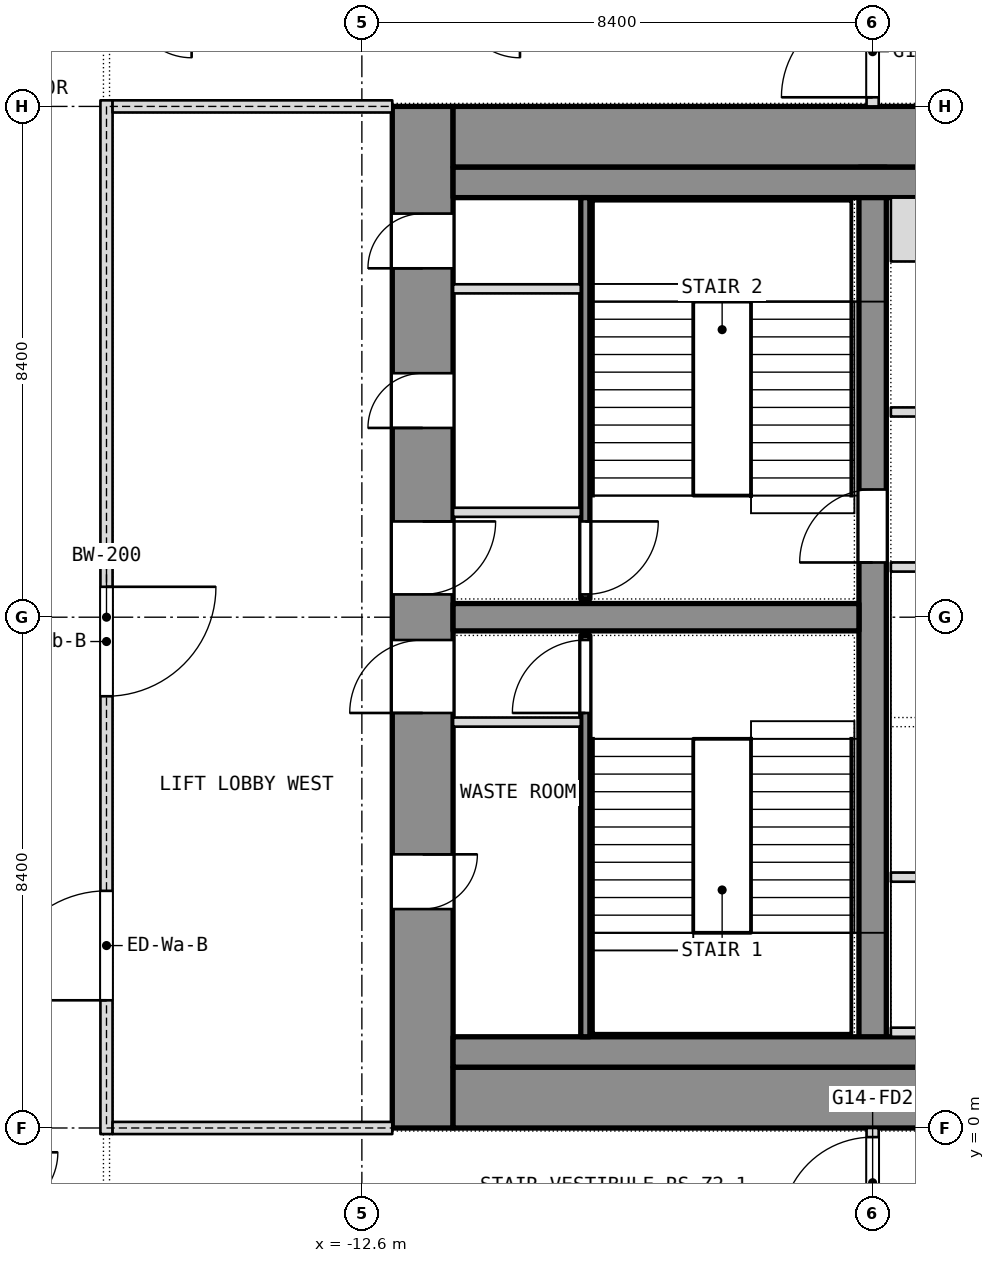
"""IFC4 building model, lengths in metres.
Left out: names, types, materials, properties, quantities, classifications, styles, units other than length and angle.
Written with IfcOpenShell. Run it as: python <this file> out.ifc"""

import sys

from ifc_helpers import new_model, si_unit, direction, frame, frame_2d, origin, place, context, subcontext, project, spatial, rectangle, extrude, element, fill, save


model = new_model("IFC4")
c1 = context("Model", 3, precision=1e-05, world=origin(), true_north=direction((0.0, 1.0)))
c2 = subcontext(c1, "Body", "Model", "MODEL_VIEW")
j1 = project(units=[si_unit("LENGTHUNIT", "METRE"), si_unit("PLANEANGLEUNIT", "RADIAN")], contexts=[c1])
p1 = place(None, origin())
s1 = spatial("IfcSite", under=j1, at=p1, CompositionType="ELEMENT")
p2 = place(p1, origin())
s2 = spatial("IfcBuilding", under=s1, at=p2, CompositionType="ELEMENT")
p3 = place(p2, frame((0.0, 0.0, 166.1)))
s3 = spatial("IfcBuildingStorey", under=s2, at=p3, CompositionType="ELEMENT", Elevation=166.1)
p4 = place(p3, frame((-11.6, 0.0, 0.0), z_axis=(0.0, 0.0, 1.0), x_axis=(0.0, 1.0, 0.0)))
e1 = element("IfcWall", 1, at=p4, inside=s3, PredefinedType="SHEAR", context=c2, shape_type="SweptSolid", body=[
    extrude(rectangle(XDim=16.8, YDim=1.0, at=frame_2d((8.4, 0.0))), origin(), (0.0, 0.0, 1.0), 3.6),
])
p5 = place(p4, frame((3.6, 0.0, 0.0)))
e2 = element("IfcOpeningElement", 2, at=p5, cuts=e1, PredefinedType="OPENING", context=c2, shape_type="SweptSolid", body=[
    extrude(rectangle(XDim=0.9, YDim=2.1, at=frame_2d((0.45, 1.05))), frame((0.0, 0.5, 0.0), z_axis=(0.0, -1.0, 0.0), x_axis=(1.0, 0.0, 0.0)), (0.0, 0.0, 1.0), 1.0),
])
p6 = place(p4, frame((6.825, 0.0, 0.0)))
e3 = element("IfcOpeningElement", 3, at=p6, cuts=e1, PredefinedType="OPENING", context=c2, shape_type="SweptSolid", body=[
    extrude(rectangle(XDim=1.2, YDim=2.1, at=frame_2d((0.6, 1.05))), frame((0.0, 0.5, 0.0), z_axis=(0.0, -1.0, 0.0), x_axis=(1.0, 0.0, 0.0)), (0.0, 0.0, 1.0), 1.0),
])
p7 = place(p4, frame((14.137, 0.0, 0.0)))
e4 = element("IfcOpeningElement", 4, at=p7, cuts=e1, PredefinedType="OPENING", context=c2, shape_type="SweptSolid", body=[
    extrude(rectangle(XDim=0.9, YDim=2.1, at=frame_2d((0.45, 1.05))), frame((0.0, 0.5, 0.0), z_axis=(0.0, -1.0, 0.0), x_axis=(1.0, 0.0, 0.0)), (0.0, 0.0, 1.0), 1.0),
])
p8 = place(p4, frame((11.512, 0.0, 0.0)))
e5 = element("IfcOpeningElement", 5, at=p8, cuts=e1, PredefinedType="OPENING", context=c2, shape_type="SweptSolid", body=[
    extrude(rectangle(XDim=0.9, YDim=2.1, at=frame_2d((0.45, 1.05))), frame((0.0, 0.5, 0.0), z_axis=(0.0, -1.0, 0.0), x_axis=(1.0, 0.0, 0.0)), (0.0, 0.0, 1.0), 1.0),
])
p9 = place(p4, frame((8.775, 0.0, 0.0)))
e6 = element("IfcOpeningElement", 6, at=p9, cuts=e1, PredefinedType="OPENING", context=c2, shape_type="SweptSolid", body=[
    extrude(rectangle(XDim=1.2, YDim=2.1, at=frame_2d((0.6, 1.05))), frame((0.0, 0.5, 0.0), z_axis=(0.0, -1.0, 0.0), x_axis=(1.0, 0.0, 0.0)), (0.0, 0.0, 1.0), 1.0),
])
for number, where, z_axis, x_axis in (
    (7, (-11.1, 0.5, 0.0), (0.0, 0.0, 1.0), (1.0, 0.0, 0.0)),
    (8, (-11.1, 16.3, 0.0), (0.0, 0.0, 1.0), (1.0, 0.0, 0.0)),
):
    element("IfcWall", number, at=place(p3, frame(where, z_axis=z_axis, x_axis=x_axis)), inside=s3, PredefinedType="SHEAR", context=c2, shape_type="SweptSolid", body=[
        extrude(rectangle(XDim=22.2, YDim=1.0, at=frame_2d((11.1, 0.0))), origin(), (0.0, 0.0, 1.0), 3.6),
    ])
p10 = place(p3, frame((-4.2, 1.0, 0.0), z_axis=(0.0, 0.0, 1.0), x_axis=(0.0, 1.0, 0.0)))
e9 = element("IfcWall", 9, at=p10, inside=s3, PredefinedType="SHEAR", context=c2, shape_type="SweptSolid", body=[
    extrude(rectangle(XDim=14.8, YDim=0.45, at=frame_2d((7.4, 0.0))), origin(), (0.0, 0.0, 1.0), 3.6),
])
p11 = place(p10, frame((8.3, 0.0, 0.0)))
e10 = element("IfcOpeningElement", 10, at=p11, cuts=e9, PredefinedType="OPENING", context=c2, shape_type="SweptSolid", body=[
    extrude(rectangle(XDim=1.2, YDim=2.1, at=frame_2d((0.6, 1.05))), frame((0.0, 0.225, 0.0), z_axis=(0.0, -1.0, 0.0), x_axis=(1.0, 0.0, 0.0)), (0.0, 0.0, 1.0), 0.45),
])
p12 = place(p3, frame((-11.1, 8.4, 0.0), z_axis=(0.0, 0.0, 1.0), x_axis=(1.0, 0.0, 0.0)))
e11 = element("IfcWall", 11, at=p12, inside=s3, PredefinedType="SHEAR", context=c2, shape_type="SweptSolid", body=[
    extrude(rectangle(XDim=6.675, YDim=0.45, at=frame_2d((3.337, 0.0))), origin(), (0.0, 0.0, 1.0), 3.6),
])
p13 = place(p3, frame((-4.2, 16.8, 0.0), z_axis=(0.0, 0.0, 1.0), x_axis=(0.0, 1.0, 0.0)))
e12 = element("IfcWall", 12, at=p13, inside=s3, PredefinedType="PARTITIONING", context=c2, shape_type="SweptSolid", body=[
    extrude(rectangle(XDim=11.14, YDim=0.2, at=frame_2d((5.57, 0.0))), origin(), (0.0, 0.0, 1.0), 3.3),
])
p14 = place(p13, frame((0.15, 0.0, 0.0)))
e13 = element("IfcOpeningElement", 13, at=p14, cuts=e12, PredefinedType="OPENING", context=c2, shape_type="SweptSolid", body=[
    extrude(rectangle(XDim=1.5, YDim=2.1, at=frame_2d((0.75, 1.05))), frame((0.0, 0.1, 0.0), z_axis=(0.0, -1.0, 0.0), x_axis=(1.0, 0.0, 0.0)), (0.0, 0.0, 1.0), 0.2),
])
p15 = place(p3, frame((-4.2, -13.8, 0.0), z_axis=(0.0, 0.0, 1.0), x_axis=(0.0, 1.0, 0.0)))
e14 = element("IfcWall", 14, at=p15, inside=s3, PredefinedType="PARTITIONING", context=c2, shape_type="SweptSolid", body=[
    extrude(rectangle(XDim=13.8, YDim=0.2, at=frame_2d((6.9, 0.0))), origin(), (0.0, 0.0, 1.0), 2.486),
])
p16 = place(p15, frame((12.15, 0.0, 0.0)))
e15 = element("IfcOpeningElement", 15, at=p16, cuts=e14, PredefinedType="OPENING", context=c2, shape_type="SweptSolid", body=[
    extrude(rectangle(XDim=1.5, YDim=2.1, at=frame_2d((0.75, 1.05))), frame((0.0, 0.1, 0.0), z_axis=(0.0, -1.0, 0.0), x_axis=(1.0, 0.0, 0.0)), (0.0, 0.0, 1.0), 0.2),
])
p17 = place(p15, frame((0.325, 0.0, 0.0)))
e16 = element("IfcOpeningElement", 16, at=p17, cuts=e14, PredefinedType="OPENING", context=c2, shape_type="SweptSolid", body=[
    extrude(rectangle(XDim=1.5, YDim=2.1, at=frame_2d((0.75, 1.05))), frame((0.0, 0.1, 0.0), z_axis=(0.0, -1.0, 0.0), x_axis=(1.0, 0.0, 0.0)), (0.0, 0.0, 1.0), 0.2),
])
for number, where, z_axis, x_axis in (
    (17, (-11.1, 1.25, 0.0), (0.0, 0.0, 1.0), (1.0, 0.0, 0.0)),
    (18, (-11.1, 15.55, 0.0), (0.0, 0.0, 1.0), (1.0, 0.0, 0.0)),
):
    element("IfcWall", number, at=place(p3, frame(where, z_axis=z_axis, x_axis=x_axis)), inside=s3, PredefinedType="PARTITIONING", context=c2, shape_type="SweptSolid", body=[
        extrude(rectangle(XDim=22.2, YDim=0.5, at=frame_2d((11.1, 0.0))), origin(), (0.0, 0.0, 1.0), 3.3),
    ])
p18 = place(p3, frame((-8.925, 1.5, 0.0), z_axis=(0.0, 0.0, 1.0), x_axis=(0.0, 1.0, 0.0)))
e19 = element("IfcWall", 19, at=p18, inside=s3, PredefinedType="SHEAR", context=c2, shape_type="SweptSolid", body=[
    extrude(rectangle(XDim=6.6, YDim=0.15, at=frame_2d((3.3, 0.0))), origin(), (0.0, 0.0, 1.0), 3.3),
])
p19 = place(p18, frame((5.325, 0.0, 0.0)))
e20 = element("IfcOpeningElement", 20, at=p19, cuts=e19, PredefinedType="OPENING", context=c2, shape_type="SweptSolid", body=[
    extrude(rectangle(XDim=1.2, YDim=2.1, at=frame_2d((0.6, 1.05))), frame((0.0, 0.075, 0.0), z_axis=(0.0, -1.0, 0.0), x_axis=(1.0, 0.0, 0.0)), (0.0, 0.0, 1.0), 0.15),
])
p20 = place(p3, frame((-11.1, 6.675, 0.0), z_axis=(0.0, 0.0, 1.0), x_axis=(1.0, 0.0, 0.0)))
e21 = element("IfcWall", 21, at=p20, inside=s3, PredefinedType="PARTITIONING", context=c2, shape_type="SweptSolid", body=[
    extrude(rectangle(XDim=2.1, YDim=0.15, at=frame_2d((1.05, 0.0))), origin(), (0.0, 0.0, 1.0), 3.3),
])
p21 = place(p3, frame((-8.925, 8.7, 0.0), z_axis=(0.0, 0.0, 1.0), x_axis=(0.0, 1.0, 0.0)))
e22 = element("IfcWall", 22, at=p21, inside=s3, PredefinedType="SHEAR", context=c2, shape_type="SweptSolid", body=[
    extrude(rectangle(XDim=6.6, YDim=0.15, at=frame_2d((3.3, 0.0))), origin(), (0.0, 0.0, 1.0), 3.3),
])
p22 = place(p21, frame((0.075, 0.0, 0.0)))
e23 = element("IfcOpeningElement", 23, at=p22, cuts=e22, PredefinedType="OPENING", context=c2, shape_type="SweptSolid", body=[
    extrude(rectangle(XDim=1.2, YDim=2.1, at=frame_2d((0.6, 1.05))), frame((0.0, 0.075, 0.0), z_axis=(0.0, -1.0, 0.0), x_axis=(1.0, 0.0, 0.0)), (0.0, 0.0, 1.0), 0.15),
])
for number, where, z_axis, x_axis in (
    (24, (-11.1, 10.125, 0.0), (0.0, 0.0, 1.0), (1.0, 0.0, 0.0)),
    (25, (-11.1, 13.8, 0.0), (0.0, 0.0, 1.0), (1.0, 0.0, 0.0)),
):
    element("IfcWall", number, at=place(p3, frame(where, z_axis=z_axis, x_axis=x_axis)), inside=s3, PredefinedType="PARTITIONING", context=c2, shape_type="SweptSolid", body=[
        extrude(rectangle(XDim=2.1, YDim=0.15, at=frame_2d((1.05, 0.0))), origin(), (0.0, 0.0, 1.0), 3.3),
    ])
p23 = place(p3, frame((-3.9, 4.125, 0.0), z_axis=(0.0, 0.0, 1.0), x_axis=(1.0, 0.0, 0.0)))
e26 = element("IfcWall", 26, at=p23, inside=s3, PredefinedType="PARTITIONING", context=c2, shape_type="SweptSolid", body=[
    extrude(rectangle(XDim=7.8, YDim=0.15, at=frame_2d((3.9, 0.0))), origin(), (0.0, 0.0, 1.0), 3.3),
])
p24 = place(p23, frame((3.75, 0.0, 0.0)))
e27 = element("IfcOpeningElement", 27, at=p24, cuts=e26, PredefinedType="OPENING", context=c2, shape_type="SweptSolid", body=[
    extrude(rectangle(XDim=1.2, YDim=2.1, at=frame_2d((0.6, 1.05))), frame((0.0, 0.075, 0.0), z_axis=(0.0, -1.0, 0.0), x_axis=(1.0, 0.0, 0.0)), (0.0, 0.0, 1.0), 0.15),
])
p25 = place(p3, frame((-3.9, 11.775, 0.0), z_axis=(0.0, 0.0, 1.0), x_axis=(1.0, 0.0, 0.0)))
e28 = element("IfcWall", 28, at=p25, inside=s3, PredefinedType="PARTITIONING", context=c2, shape_type="SweptSolid", body=[
    extrude(rectangle(XDim=7.8, YDim=0.15, at=frame_2d((3.9, 0.0))), origin(), (0.0, 0.0, 1.0), 3.3),
])
p26 = place(p25, frame((3.3, 0.0, 0.0)))
e29 = element("IfcOpeningElement", 29, at=p26, cuts=e28, PredefinedType="OPENING", context=c2, shape_type="SweptSolid", body=[
    extrude(rectangle(XDim=1.2, YDim=2.1, at=frame_2d((0.6, 1.05))), frame((0.0, 0.075, 0.0), z_axis=(0.0, -1.0, 0.0), x_axis=(1.0, 0.0, 0.0)), (0.0, 0.0, 1.0), 0.15),
])
p27 = place(p3, frame((-3.9, 1.575, 0.0), z_axis=(0.0, 0.0, 1.0), x_axis=(1.0, 0.0, 0.0)))
e30 = element("IfcWall", 30, at=p27, inside=s3, PredefinedType="SHEAR", context=c2, shape_type="SweptSolid", body=[
    extrude(rectangle(XDim=3.0, YDim=0.15, at=frame_2d((1.5, 0.0))), origin(), (0.0, 0.0, 1.0), 3.6),
])
p28 = place(p3, frame((-3.9, 9.225, 0.0), z_axis=(0.0, 0.0, 1.0), x_axis=(1.0, 0.0, 0.0)))
e31 = element("IfcWall", 31, at=p28, inside=s3, PredefinedType="SHEAR", context=c2, shape_type="SweptSolid", body=[
    extrude(rectangle(XDim=2.25, YDim=0.15, at=frame_2d((1.125, 0.0))), origin(), (0.0, 0.0, 1.0), 3.6),
])
p29 = place(p3, frame((-3.9, 14.775, 0.0), z_axis=(0.0, 0.0, 1.0), x_axis=(1.0, 0.0, 0.0)))
e32 = element("IfcWall", 32, at=p29, inside=s3, PredefinedType="PARTITIONING", context=c2, shape_type="SweptSolid", body=[
    extrude(rectangle(XDim=2.25, YDim=1.05, at=frame_2d((1.125, 0.0))), origin(), (0.0, 0.0, 1.0), 3.3),
])
p30 = place(p3, frame((-16.8, -0.1, 0.0), z_axis=(0.0, 0.0, 1.0), x_axis=(0.0, 1.0, 0.0)))
e33 = element("IfcWall", 33, at=p30, inside=s3, PredefinedType="PARTITIONING", context=c2, shape_type="SweptSolid", body=[
    extrude(rectangle(XDim=17.0, YDim=0.2, at=frame_2d((8.5, 0.0))), origin(), (0.0, 0.0, 1.0), 3.3),
])
p31 = place(p30, frame((2.2, 0.0, 0.0)))
e34 = element("IfcOpeningElement", 34, at=p31, cuts=e33, PredefinedType="OPENING", context=c2, shape_type="SweptSolid", body=[
    extrude(rectangle(XDim=1.8, YDim=2.1, at=frame_2d((0.9, 1.05))), frame((0.0, 0.1, 0.0), z_axis=(0.0, -1.0, 0.0), x_axis=(1.0, 0.0, 0.0)), (0.0, 0.0, 1.0), 0.2),
])
p32 = place(p30, frame((7.2, 0.0, 0.0)))
e35 = element("IfcOpeningElement", 35, at=p32, cuts=e33, PredefinedType="OPENING", context=c2, shape_type="SweptSolid", body=[
    extrude(rectangle(XDim=1.8, YDim=2.1, at=frame_2d((0.9, 1.05))), frame((0.0, 0.1, 0.0), z_axis=(0.0, -1.0, 0.0), x_axis=(1.0, 0.0, 0.0)), (0.0, 0.0, 1.0), 0.2),
])
for number, where, z_axis, x_axis in (
    (36, (-16.7, 0.0, 0.0), (0.0, 0.0, 1.0), (1.0, 0.0, 0.0)),
    (37, (-16.7, 16.8, 0.0), (0.0, 0.0, 1.0), (1.0, 0.0, 0.0)),
):
    element("IfcWall", number, at=place(p3, frame(where, z_axis=z_axis, x_axis=x_axis)), inside=s3, PredefinedType="PARTITIONING", context=c2, shape_type="SweptSolid", body=[
        extrude(rectangle(XDim=4.6, YDim=0.2, at=frame_2d((2.3, 0.0))), origin(), (0.0, 0.0, 1.0), 2.85),
    ])
p33 = place(p5, origin())
e38 = element("IfcDoor", 38, at=p33, inside=s3, OperationType="SINGLE_SWING_LEFT", PredefinedType="DOOR", context=c2, shape_type="SweptSolid", body=[
    extrude(rectangle(XDim=0.9, YDim=2.1, at=frame_2d((0.45, 1.05))), frame((0.0, 0.025, 0.0), z_axis=(0.0, -1.0, 0.0), x_axis=(1.0, 0.0, 0.0)), (0.0, 0.0, 1.0), 0.05),
])
fill(e2, e38)
p34 = place(p6, origin())
e39 = element("IfcDoor", 39, at=p34, inside=s3, OperationType="SINGLE_SWING_LEFT", PredefinedType="DOOR", context=c2, shape_type="SweptSolid", body=[
    extrude(rectangle(XDim=1.2, YDim=2.1, at=frame_2d((0.6, 1.05))), frame((0.0, 0.025, 0.0), z_axis=(0.0, -1.0, 0.0), x_axis=(1.0, 0.0, 0.0)), (0.0, 0.0, 1.0), 0.05),
])
fill(e3, e39)
p35 = place(p19, origin())
e40 = element("IfcDoor", 40, at=p35, inside=s3, OperationType="SINGLE_SWING_LEFT", PredefinedType="DOOR", context=c2, shape_type="SweptSolid", body=[
    extrude(rectangle(XDim=1.2, YDim=2.1, at=frame_2d((0.6, 1.05))), frame((0.0, 0.025, 0.0), z_axis=(0.0, -1.0, 0.0), x_axis=(1.0, 0.0, 0.0)), (0.0, 0.0, 1.0), 0.05),
])
fill(e20, e40)
p36 = place(p7, origin())
e41 = element("IfcDoor", 41, at=p36, inside=s3, OperationType="SINGLE_SWING_LEFT", PredefinedType="DOOR", context=c2, shape_type="SweptSolid", body=[
    extrude(rectangle(XDim=0.9, YDim=2.1, at=frame_2d((0.45, 1.05))), frame((0.0, 0.025, 0.0), z_axis=(0.0, -1.0, 0.0), x_axis=(1.0, 0.0, 0.0)), (0.0, 0.0, 1.0), 0.05),
])
fill(e4, e41)
p37 = place(p8, origin())
e42 = element("IfcDoor", 42, at=p37, inside=s3, OperationType="SINGLE_SWING_LEFT", PredefinedType="DOOR", context=c2, shape_type="SweptSolid", body=[
    extrude(rectangle(XDim=0.9, YDim=2.1, at=frame_2d((0.45, 1.05))), frame((0.0, 0.025, 0.0), z_axis=(0.0, -1.0, 0.0), x_axis=(1.0, 0.0, 0.0)), (0.0, 0.0, 1.0), 0.05),
])
fill(e5, e42)
p38 = place(p9, origin())
e43 = element("IfcDoor", 43, at=p38, inside=s3, OperationType="SINGLE_SWING_LEFT", PredefinedType="DOOR", context=c2, shape_type="SweptSolid", body=[
    extrude(rectangle(XDim=1.2, YDim=2.1, at=frame_2d((0.6, 1.05))), frame((0.0, 0.025, 0.0), z_axis=(0.0, -1.0, 0.0), x_axis=(1.0, 0.0, 0.0)), (0.0, 0.0, 1.0), 0.05),
])
fill(e6, e43)
p39 = place(p22, origin())
e44 = element("IfcDoor", 44, at=p39, inside=s3, OperationType="SINGLE_SWING_LEFT", PredefinedType="DOOR", context=c2, shape_type="SweptSolid", body=[
    extrude(rectangle(XDim=1.2, YDim=2.1, at=frame_2d((0.6, 1.05))), frame((0.0, 0.025, 0.0), z_axis=(0.0, -1.0, 0.0), x_axis=(1.0, 0.0, 0.0)), (0.0, 0.0, 1.0), 0.05),
])
fill(e23, e44)
p40 = place(p11, origin())
e45 = element("IfcDoor", 45, at=p40, inside=s3, OperationType="SINGLE_SWING_LEFT", PredefinedType="DOOR", context=c2, shape_type="SweptSolid", body=[
    extrude(rectangle(XDim=1.2, YDim=2.1, at=frame_2d((0.6, 1.05))), frame((0.0, 0.025, 0.0), z_axis=(0.0, -1.0, 0.0), x_axis=(1.0, 0.0, 0.0)), (0.0, 0.0, 1.0), 0.05),
])
fill(e10, e45)
p41 = place(p31, origin())
e46 = element("IfcDoor", 46, at=p41, inside=s3, OperationType="DOUBLE_DOOR_SINGLE_SWING", PredefinedType="DOOR", context=c2, shape_type="SweptSolid", body=[
    extrude(rectangle(XDim=1.8, YDim=2.1, at=frame_2d((0.9, 1.05))), frame((0.0, 0.025, 0.0), z_axis=(0.0, -1.0, 0.0), x_axis=(1.0, 0.0, 0.0)), (0.0, 0.0, 1.0), 0.05),
])
fill(e34, e46)
p42 = place(p32, origin())
e47 = element("IfcDoor", 47, at=p42, inside=s3, OperationType="DOUBLE_DOOR_SINGLE_SWING", PredefinedType="DOOR", context=c2, shape_type="SweptSolid", body=[
    extrude(rectangle(XDim=1.8, YDim=2.1, at=frame_2d((0.9, 1.05))), frame((0.0, 0.025, 0.0), z_axis=(0.0, -1.0, 0.0), x_axis=(1.0, 0.0, 0.0)), (0.0, 0.0, 1.0), 0.05),
])
fill(e35, e47)
p43 = place(p14, origin())
e48 = element("IfcDoor", 48, at=p43, inside=s3, OperationType="DOUBLE_DOOR_DOUBLE_SWING", PredefinedType="DOOR", context=c2, shape_type="SweptSolid", body=[
    extrude(rectangle(XDim=1.5, YDim=2.1, at=frame_2d((0.75, 1.05))), frame((0.0, 0.025, 0.0), z_axis=(0.0, -1.0, 0.0), x_axis=(1.0, 0.0, 0.0)), (0.0, 0.0, 1.0), 0.05),
])
fill(e13, e48)
p44 = place(p16, origin())
e49 = element("IfcDoor", 49, at=p44, inside=s3, OperationType="DOUBLE_DOOR_DOUBLE_SWING", PredefinedType="DOOR", context=c2, shape_type="SweptSolid", body=[
    extrude(rectangle(XDim=1.5, YDim=2.1, at=frame_2d((0.75, 1.05))), frame((0.0, 0.025, 0.0), z_axis=(0.0, -1.0, 0.0), x_axis=(1.0, 0.0, 0.0)), (0.0, 0.0, 1.0), 0.05),
])
fill(e15, e49)
save(model, sys.argv[1])
